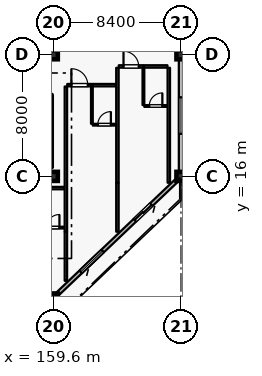
"""IFC4 building model, lengths in metres.
Left out: names, types, materials, properties, quantities, classifications, styles, units other than length and angle.
Written with IfcOpenShell. Run it as: python <this file> out.ifc"""

import sys

from ifc_helpers import new_model, si_unit, direction, frame, frame_2d, origin, origin_2d, place, context, subcontext, project, spatial, rectangle, extrude, element, fill, save


model = new_model("IFC4")
c1 = context("Model", 3, precision=1e-05, world=origin(), true_north=direction((0.0, 1.0)))
c2 = subcontext(c1, "Body", "Model", "MODEL_VIEW")
j1 = project(units=[si_unit("LENGTHUNIT", "METRE"), si_unit("PLANEANGLEUNIT", "RADIAN")], contexts=[c1])
p1 = place(None, origin())
s1 = spatial("IfcSite", under=j1, at=p1, CompositionType="ELEMENT")
p2 = place(p1, origin())
s2 = spatial("IfcBuilding", under=s1, at=p2, CompositionType="ELEMENT")
p3 = place(p2, frame((0.0, 0.0, 43.2)))
s3 = spatial("IfcBuildingStorey", under=s2, at=p3, CompositionType="ELEMENT", Elevation=43.2)
for number, where, z_axis, x_axis in (
    (1, (159.6, 8.0, 0.0), (0.0, 0.0, 1.0), (1.0, 0.0, 0.0)),
    (2, (159.6, 24.0, 0.0), (0.0, 0.0, 1.0), (1.0, 0.0, 0.0)),
    (3, (168.0, 16.0, 0.0), (0.0, 0.0, 1.0), (1.0, 0.0, 0.0)),
    (4, (159.6, 16.0, 0.0), (0.0, 0.0, 1.0), (1.0, 0.0, 0.0)),
    (5, (168.0, 24.0, 0.0), (0.0, 0.0, 1.0), (1.0, 0.0, 0.0)),
):
    element("IfcColumn", number, at=place(p3, frame(where, z_axis=z_axis, x_axis=x_axis)), inside=s3, PredefinedType="COLUMN", context=c2, shape_type="SweptSolid", body=[
        extrude(rectangle(XDim=0.6, YDim=0.6, at=origin_2d()), origin(), (0.0, 0.0, 1.0), 4.2),
    ])
p4 = place(p3, frame((167.7, 15.714, 0.0), z_axis=(0.0, 0.0, 1.0), x_axis=(-0.724156257633, -0.689635928973, 0.0)))
e6 = element("IfcWall", 6, at=p4, inside=s3, PredefinedType="SOLIDWALL", context=c2, shape_type="SweptSolid", body=[
    extrude(rectangle(XDim=10.771, YDim=0.24, at=frame_2d((5.386, 0.0))), origin(), (0.0, 0.0, 1.0), 3.49),
])
p5 = place(p4, frame((2.274, 0.0, 0.0)))
e7 = element("IfcOpeningElement", 7, at=p5, cuts=e6, PredefinedType="OPENING", context=c2, shape_type="SweptSolid", body=[
    extrude(rectangle(XDim=1.5, YDim=2.25, at=frame_2d((0.75, 1.125))), frame((0.0, 0.13, 0.0), z_axis=(0.0, -1.0, 0.0), x_axis=(1.0, 0.0, 0.0)), (0.0, 0.0, 1.0), 0.26),
])
p6 = place(p4, frame((6.699, 0.0, 0.8)))
e8 = element("IfcOpeningElement", 8, at=p6, cuts=e6, PredefinedType="OPENING", context=c2, shape_type="SweptSolid", body=[
    extrude(rectangle(XDim=2.0, YDim=1.75, at=frame_2d((1.0, 0.875))), frame((0.0, 0.13, 0.0), z_axis=(0.0, -1.0, 0.0), x_axis=(1.0, 0.0, 0.0)), (0.0, 0.0, 1.0), 0.26),
])
p7 = place(p3, frame((168.0, 23.7, 0.0), z_axis=(0.0, 0.0, 1.0), x_axis=(0.0, -1.0, 0.0)))
e9 = element("IfcWall", 9, at=p7, inside=s3, PredefinedType="SOLIDWALL", context=c2, shape_type="SweptSolid", body=[
    extrude(rectangle(XDim=7.4, YDim=0.28, at=frame_2d((3.7, 0.0))), origin(), (0.0, 0.0, 1.0), 3.3),
])
p8 = place(p7, frame((2.5, 0.0, 0.75)))
e10 = element("IfcOpeningElement", 10, at=p8, cuts=e9, PredefinedType="OPENING", context=c2, shape_type="SweptSolid", body=[
    extrude(rectangle(XDim=2.4, YDim=1.65, at=frame_2d((1.2, 0.825))), frame((0.0, 0.15, 0.0), z_axis=(0.0, -1.0, 0.0), x_axis=(1.0, 0.0, 0.0)), (0.0, 0.0, 1.0), 0.3),
])
p9 = place(p3, frame((158.77, 15.23, 0.0), z_axis=(0.0, 0.0, 1.0), x_axis=(1.0, 0.0, 0.0)))
e11 = element("IfcWall", 11, at=p9, inside=s3, PredefinedType="PARTITIONING", context=c2, shape_type="SweptSolid", body=[
    extrude(rectangle(XDim=1.57, YDim=0.16, at=frame_2d((0.785, 0.0))), origin(), (0.0, 0.0, 1.0), 3.935),
])
p10 = place(p3, frame((158.82, 12.63, 0.0), z_axis=(0.0, 0.0, 1.0), x_axis=(1.0, 0.0, 0.0)))
e12 = element("IfcWall", 12, at=p10, inside=s3, PredefinedType="PARTITIONING", context=c2, shape_type="SweptSolid", body=[
    extrude(rectangle(XDim=1.51, YDim=0.115, at=frame_2d((0.755, 0.0))), origin(), (0.0, 0.0, 1.0), 3.935),
])
p11 = place(p10, frame((0.325, 0.0, 0.0)))
e13 = element("IfcOpeningElement", 13, at=p11, cuts=e12, PredefinedType="OPENING", context=c2, shape_type="SweptSolid", body=[
    extrude(rectangle(XDim=0.86, YDim=2.12, at=frame_2d((0.43, 1.06))), frame((0.0, 0.067, 0.0), z_axis=(0.0, -1.0, 0.0), x_axis=(1.0, 0.0, 0.0)), (0.0, 0.0, 1.0), 0.135),
])
p12 = place(p3, frame((160.43, 9.13, 0.0), z_axis=(0.0, 0.0, 1.0), x_axis=(0.0, 1.0, 0.0)))
e14 = element("IfcWall", 14, at=p12, inside=s3, PredefinedType="PARTITIONING", context=c2, shape_type="SweptSolid", body=[
    extrude(rectangle(XDim=3.22, YDim=0.16, at=frame_2d((1.61, 0.0))), origin(), (0.0, 0.0, 1.0), 3.935),
])
p13 = place(p3, frame((160.52, 22.0, 0.0), z_axis=(0.0, 0.0, 1.0), x_axis=(1.0, 0.0, 0.0)))
e15 = element("IfcWall", 15, at=p13, inside=s3, PredefinedType="PARTITIONING", context=c2, shape_type="SweptSolid", body=[
    extrude(rectangle(XDim=1.62, YDim=0.16, at=frame_2d((0.81, 0.0))), origin(), (0.0, 0.0, 1.0), 3.935),
])
p14 = place(p13, frame((0.27, 0.0, 0.0)))
e16 = element("IfcOpeningElement", 16, at=p14, cuts=e15, PredefinedType="OPENING", context=c2, shape_type="SweptSolid", body=[
    extrude(rectangle(XDim=1.08, YDim=2.3, at=frame_2d((0.54, 1.15))), frame((0.0, 0.09, 0.0), z_axis=(0.0, -1.0, 0.0), x_axis=(1.0, 0.0, 0.0)), (0.0, 0.0, 1.0), 0.18),
])
p15 = place(p3, frame((162.15, 22.0, 0.0), z_axis=(0.0, 0.0, 1.0), x_axis=(1.0, 0.0, 0.0)))
e17 = element("IfcWall", 17, at=p15, inside=s3, PredefinedType="PARTITIONING", context=c2, shape_type="SweptSolid", body=[
    extrude(rectangle(XDim=1.58, YDim=0.16, at=frame_2d((0.79, 0.0))), origin(), (0.0, 0.0, 1.0), 3.935),
])
p16 = place(p3, frame((162.14, 19.46, 0.0), z_axis=(0.0, 0.0, 1.0), x_axis=(0.0, 1.0, 0.0)))
e18 = element("IfcWall", 18, at=p16, inside=s3, PredefinedType="PARTITIONING", context=c2, shape_type="SweptSolid", body=[
    extrude(rectangle(XDim=2.45, YDim=0.115, at=frame_2d((1.225, 0.0))), origin(), (0.0, 0.0, 1.0), 3.935),
])
p17 = place(p3, frame((162.2, 19.4, 0.0), z_axis=(0.0, 0.0, 1.0), x_axis=(1.0, 0.0, 0.0)))
e19 = element("IfcWall", 19, at=p17, inside=s3, PredefinedType="PARTITIONING", context=c2, shape_type="SweptSolid", body=[
    extrude(rectangle(XDim=1.52, YDim=0.115, at=frame_2d((0.76, 0.0))), origin(), (0.0, 0.0, 1.0), 3.935),
])
p18 = place(p17, frame((0.33, 0.0, 0.0)))
e20 = element("IfcOpeningElement", 20, at=p18, cuts=e19, PredefinedType="OPENING", context=c2, shape_type="SweptSolid", body=[
    extrude(rectangle(XDim=0.86, YDim=2.12, at=frame_2d((0.43, 1.06))), frame((0.0, 0.067, 0.0), z_axis=(0.0, -1.0, 0.0), x_axis=(1.0, 0.0, 0.0)), (0.0, 0.0, 1.0), 0.135),
])
p19 = place(p3, frame((160.43, 12.36, 0.0), z_axis=(0.0, 0.0, 1.0), x_axis=(0.0, 1.0, 0.0)))
e21 = element("IfcWall", 21, at=p19, inside=s3, PredefinedType="PARTITIONING", context=c2, shape_type="SweptSolid", body=[
    extrude(rectangle(XDim=9.55, YDim=0.16, at=frame_2d((4.775, 0.0))), origin(), (0.0, 0.0, 1.0), 3.935),
])
p20 = place(p3, frame((163.82, 12.36, 0.0), z_axis=(0.0, 0.0, 1.0), x_axis=(0.0, 1.0, 0.0)))
e22 = element("IfcWall", 22, at=p20, inside=s3, PredefinedType="PARTITIONING", context=c2, shape_type="SweptSolid", body=[
    extrude(rectangle(XDim=3.21, YDim=0.16, at=frame_2d((1.605, 0.0))), origin(), (0.0, 0.0, 1.0), 3.935),
])
p21 = place(p3, frame((163.91, 23.23, 0.0), z_axis=(0.0, 0.0, 1.0), x_axis=(1.0, 0.0, 0.0)))
e23 = element("IfcWall", 23, at=p21, inside=s3, PredefinedType="PARTITIONING", context=c2, shape_type="SweptSolid", body=[
    extrude(rectangle(XDim=1.62, YDim=0.16, at=frame_2d((0.81, 0.0))), origin(), (0.0, 0.0, 1.0), 3.935),
])
p22 = place(p21, frame((0.31, 0.0, 0.0)))
e24 = element("IfcOpeningElement", 24, at=p22, cuts=e23, PredefinedType="OPENING", context=c2, shape_type="SweptSolid", body=[
    extrude(rectangle(XDim=1.0, YDim=2.25, at=frame_2d((0.5, 1.125))), frame((0.0, 0.09, 0.0), z_axis=(0.0, -1.0, 0.0), x_axis=(1.0, 0.0, 0.0)), (0.0, 0.0, 1.0), 0.18),
])
p23 = place(p3, frame((165.54, 23.23, 0.0), z_axis=(0.0, 0.0, 1.0), x_axis=(1.0, 0.0, 0.0)))
e25 = element("IfcWall", 25, at=p23, inside=s3, PredefinedType="PARTITIONING", context=c2, shape_type="SweptSolid", body=[
    extrude(rectangle(XDim=1.57, YDim=0.16, at=frame_2d((0.785, 0.0))), origin(), (0.0, 0.0, 1.0), 3.935),
])
p24 = place(p3, frame((165.53, 20.69, 0.0), z_axis=(0.0, 0.0, 1.0), x_axis=(0.0, 1.0, 0.0)))
e26 = element("IfcWall", 26, at=p24, inside=s3, PredefinedType="PARTITIONING", context=c2, shape_type="SweptSolid", body=[
    extrude(rectangle(XDim=2.45, YDim=0.115, at=frame_2d((1.225, 0.0))), origin(), (0.0, 0.0, 1.0), 3.935),
])
p25 = place(p3, frame((165.59, 20.63, 0.0), z_axis=(0.0, 0.0, 1.0), x_axis=(1.0, 0.0, 0.0)))
e27 = element("IfcWall", 27, at=p25, inside=s3, PredefinedType="PARTITIONING", context=c2, shape_type="SweptSolid", body=[
    extrude(rectangle(XDim=1.51, YDim=0.115, at=frame_2d((0.755, 0.0))), origin(), (0.0, 0.0, 1.0), 3.935),
])
p26 = place(p25, frame((0.325, 0.0, 0.0)))
e28 = element("IfcOpeningElement", 28, at=p26, cuts=e27, PredefinedType="OPENING", context=c2, shape_type="SweptSolid", body=[
    extrude(rectangle(XDim=0.86, YDim=2.12, at=frame_2d((0.43, 1.06))), frame((0.0, 0.067, 0.0), z_axis=(0.0, -1.0, 0.0), x_axis=(1.0, 0.0, 0.0)), (0.0, 0.0, 1.0), 0.135),
])
for number, where, z_axis, x_axis in (
    (29, (163.82, 15.58, 0.0), (0.0, 0.0, 1.0), (0.0, 1.0, 0.0)),
    (30, (167.2, 15.58, 0.0), (0.0, 0.0, 1.0), (0.0, 1.0, 0.0)),
):
    element("IfcWall", number, at=place(p3, frame(where, z_axis=z_axis, x_axis=x_axis)), inside=s3, PredefinedType="PARTITIONING", context=c2, shape_type="SweptSolid", body=[
        extrude(rectangle(XDim=7.56, YDim=0.16, at=frame_2d((3.78, 0.0))), origin(), (0.0, 0.0, 1.0), 3.935),
    ])
p27 = place(p5, origin())
e31 = element("IfcDoor", 31, at=p27, inside=s3, OperationType="SLIDING_TO_LEFT", PredefinedType="DOOR", context=c2, shape_type="SweptSolid", body=[
    extrude(rectangle(XDim=1.5, YDim=2.25, at=frame_2d((0.75, 1.125))), frame((0.0, 0.025, 0.0), z_axis=(0.0, -1.0, 0.0), x_axis=(1.0, 0.0, 0.0)), (0.0, 0.0, 1.0), 0.05),
])
fill(e7, e31)
p28 = place(p6, origin())
e32 = element("IfcWindow", 32, at=p28, inside=s3, PartitioningType="DOUBLE_PANEL_VERTICAL", PredefinedType="WINDOW", context=c2, shape_type="SweptSolid", body=[
    extrude(rectangle(XDim=2.0, YDim=1.75, at=frame_2d((1.0, 0.875))), frame((0.0, 0.03, 0.0), z_axis=(0.0, -1.0, 0.0), x_axis=(1.0, 0.0, 0.0)), (0.0, 0.0, 1.0), 0.06),
])
fill(e8, e32)
p29 = place(p8, origin())
e33 = element("IfcWindow", 33, at=p29, inside=s3, PartitioningType="DOUBLE_PANEL_VERTICAL", PredefinedType="WINDOW", context=c2, shape_type="SweptSolid", body=[
    extrude(rectangle(XDim=2.4, YDim=1.65, at=frame_2d((1.2, 0.825))), frame((0.0, 0.03, 0.0), z_axis=(0.0, -1.0, 0.0), x_axis=(1.0, 0.0, 0.0)), (0.0, 0.0, 1.0), 0.06),
])
fill(e10, e33)
p30 = place(p11, origin())
e34 = element("IfcDoor", 34, at=p30, inside=s3, OperationType="SINGLE_SWING_RIGHT", PredefinedType="DOOR", context=c2, shape_type="SweptSolid", body=[
    extrude(rectangle(XDim=0.86, YDim=2.12, at=frame_2d((0.43, 1.06))), frame((0.0, 0.025, 0.0), z_axis=(0.0, -1.0, 0.0), x_axis=(1.0, 0.0, 0.0)), (0.0, 0.0, 1.0), 0.05),
])
fill(e13, e34)
p31 = place(p14, origin())
e35 = element("IfcDoor", 35, at=p31, inside=s3, OperationType="SINGLE_SWING_LEFT", PredefinedType="DOOR", context=c2, shape_type="SweptSolid", body=[
    extrude(rectangle(XDim=1.08, YDim=2.3, at=frame_2d((0.54, 1.15))), frame((0.0, 0.025, 0.0), z_axis=(0.0, -1.0, 0.0), x_axis=(1.0, 0.0, 0.0)), (0.0, 0.0, 1.0), 0.05),
])
fill(e16, e35)
p32 = place(p18, origin())
e36 = element("IfcDoor", 36, at=p32, inside=s3, OperationType="SINGLE_SWING_RIGHT", PredefinedType="DOOR", context=c2, shape_type="SweptSolid", body=[
    extrude(rectangle(XDim=0.86, YDim=2.12, at=frame_2d((0.43, 1.06))), frame((0.0, 0.025, 0.0), z_axis=(0.0, -1.0, 0.0), x_axis=(1.0, 0.0, 0.0)), (0.0, 0.0, 1.0), 0.05),
])
fill(e20, e36)
p33 = place(p22, origin())
e37 = element("IfcDoor", 37, at=p33, inside=s3, OperationType="SINGLE_SWING_LEFT", PredefinedType="DOOR", context=c2, shape_type="SweptSolid", body=[
    extrude(rectangle(XDim=1.0, YDim=2.25, at=frame_2d((0.5, 1.125))), frame((0.0, 0.025, 0.0), z_axis=(0.0, -1.0, 0.0), x_axis=(1.0, 0.0, 0.0)), (0.0, 0.0, 1.0), 0.05),
])
fill(e24, e37)
p34 = place(p26, origin())
e38 = element("IfcDoor", 38, at=p34, inside=s3, OperationType="SINGLE_SWING_RIGHT", PredefinedType="DOOR", context=c2, shape_type="SweptSolid", body=[
    extrude(rectangle(XDim=0.86, YDim=2.12, at=frame_2d((0.43, 1.06))), frame((0.0, 0.025, 0.0), z_axis=(0.0, -1.0, 0.0), x_axis=(1.0, 0.0, 0.0)), (0.0, 0.0, 1.0), 0.05),
])
fill(e28, e38)
save(model, sys.argv[1])
